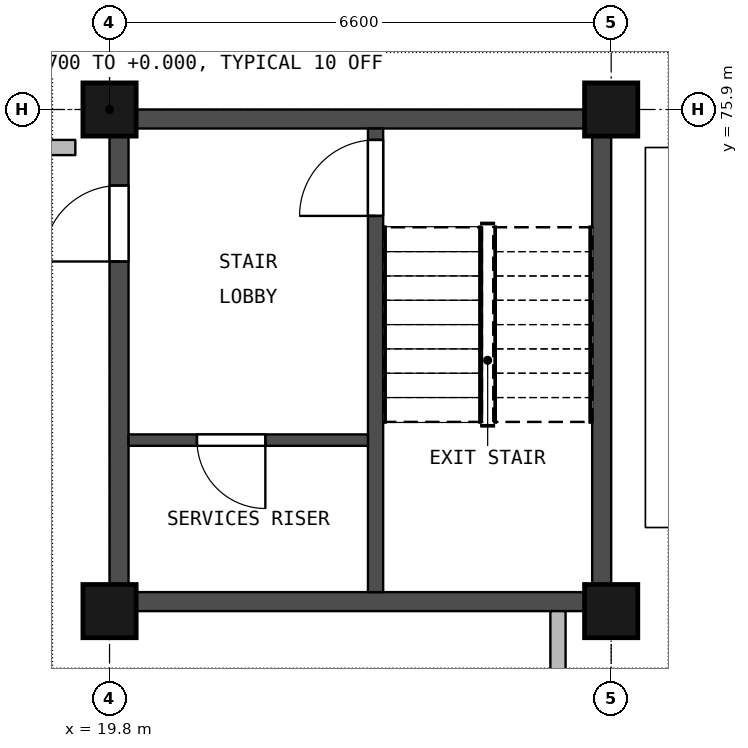
"""IFC4 building model, lengths in metres.
Left out: names, types, materials, properties, quantities, classifications, styles, units other than length and angle.
Written with IfcOpenShell. Run it as: python <this file> out.ifc"""

import sys

from ifc_helpers import new_model, si_unit, direction, frame, frame_2d, origin, origin_2d, place, context, subcontext, project, spatial, rectangle, extrude, element, fill, save


model = new_model("IFC4")
c1 = context("Model", 3, precision=1e-05, world=origin(), true_north=direction((0.0, 1.0)))
c2 = subcontext(c1, "Body", "Model", "MODEL_VIEW")
j1 = project(units=[si_unit("LENGTHUNIT", "METRE"), si_unit("PLANEANGLEUNIT", "RADIAN")], contexts=[c1])
p1 = place(None, origin())
s1 = spatial("IfcSite", under=j1, at=p1, CompositionType="ELEMENT")
p2 = place(p1, origin())
s2 = spatial("IfcBuilding", under=s1, at=p2, CompositionType="ELEMENT")
p3 = place(p2, frame((0.0, 0.0, -5.7)))
s3 = spatial("IfcBuildingStorey", under=s2, at=p3, CompositionType="ELEMENT", Elevation=-5.7)
for number, where, z_axis, x_axis in (
    (1, (19.8, 69.3, 0.0), (0.0, 0.0, 1.0), (1.0, 0.0, 0.0)),
    (2, (19.8, 75.9, 0.0), (0.0, 0.0, 1.0), (1.0, 0.0, 0.0)),
    (3, (26.4, 69.3, 0.0), (0.0, 0.0, 1.0), (1.0, 0.0, 0.0)),
    (4, (26.4, 75.9, 0.0), (0.0, 0.0, 1.0), (1.0, 0.0, 0.0)),
):
    element("IfcColumn", number, at=place(p3, frame(where, z_axis=z_axis, x_axis=x_axis)), inside=s3, PredefinedType="COLUMN", context=c2, shape_type="SweptSolid", body=[
        extrude(rectangle(XDim=0.7, YDim=0.7, at=origin_2d()), origin(), (0.0, 0.0, 1.0), 5.7),
    ])
p4 = place(p3, frame((19.925, 75.9, 0.0), z_axis=(0.0, 0.0, 1.0), x_axis=(0.0, -1.0, 0.0)))
e5 = element("IfcWall", 5, at=p4, inside=s3, PredefinedType="SHEAR", context=c2, shape_type="SweptSolid", body=[
    extrude(rectangle(XDim=6.6, YDim=0.25, at=frame_2d((3.3, 0.0))), origin(), (0.0, 0.0, 1.0), 5.2),
])
p5 = place(p4, frame((1.0, 0.0, 0.0)))
e6 = element("IfcOpeningElement", 6, at=p5, cuts=e5, PredefinedType="OPENING", context=c2, shape_type="SweptSolid", body=[
    extrude(rectangle(XDim=1.0, YDim=2.1, at=frame_2d((0.5, 1.05))), frame((0.0, 0.135, 0.0), z_axis=(0.0, -1.0, 0.0), x_axis=(1.0, 0.0, 0.0)), (0.0, 0.0, 1.0), 0.27),
])
p6 = place(p3, frame((26.275, 75.9, 0.0), z_axis=(0.0, 0.0, 1.0), x_axis=(0.0, -1.0, 0.0)))
e7 = element("IfcWall", 7, at=p6, inside=s3, PredefinedType="SHEAR", context=c2, shape_type="SweptSolid", body=[
    extrude(rectangle(XDim=6.6, YDim=0.25, at=frame_2d((3.3, 0.0))), origin(), (0.0, 0.0, 1.0), 5.2),
])
for number, where, z_axis, x_axis in (
    (8, (20.05, 75.775, 0.0), (0.0, 0.0, 1.0), (1.0, 0.0, 0.0)),
    (9, (20.05, 69.425, 0.0), (0.0, 0.0, 1.0), (1.0, 0.0, 0.0)),
):
    element("IfcWall", number, at=place(p3, frame(where, z_axis=z_axis, x_axis=x_axis)), inside=s3, PredefinedType="SHEAR", context=c2, shape_type="SweptSolid", body=[
        extrude(rectangle(XDim=6.1, YDim=0.25, at=frame_2d((3.05, 0.0))), origin(), (0.0, 0.0, 1.0), 5.2),
    ])
p7 = place(p3, frame((23.3, 75.65, 0.0), z_axis=(0.0, 0.0, 1.0), x_axis=(0.0, -1.0, 0.0)))
e10 = element("IfcWall", 10, at=p7, inside=s3, PredefinedType="SHEAR", context=c2, shape_type="SweptSolid", body=[
    extrude(rectangle(XDim=6.1, YDim=0.2, at=frame_2d((3.05, 0.0))), origin(), (0.0, 0.0, 1.0), 5.2),
])
p8 = place(p7, frame((0.15, 0.0, 0.0)))
e11 = element("IfcOpeningElement", 11, at=p8, cuts=e10, PredefinedType="OPENING", context=c2, shape_type="SweptSolid", body=[
    extrude(rectangle(XDim=1.0, YDim=2.1, at=frame_2d((0.5, 1.05))), frame((0.0, 0.11, 0.0), z_axis=(0.0, -1.0, 0.0), x_axis=(1.0, 0.0, 0.0)), (0.0, 0.0, 1.0), 0.22),
])
p9 = place(p3, frame((20.05, 71.55, 0.0), z_axis=(0.0, 0.0, 1.0), x_axis=(1.0, 0.0, 0.0)))
e12 = element("IfcWall", 12, at=p9, inside=s3, PredefinedType="SHEAR", context=c2, shape_type="SweptSolid", body=[
    extrude(rectangle(XDim=3.15, YDim=0.15, at=frame_2d((1.575, 0.0))), origin(), (0.0, 0.0, 1.0), 5.2),
])
p10 = place(p9, frame((0.9, 0.0, 0.0)))
e13 = element("IfcOpeningElement", 13, at=p10, cuts=e12, PredefinedType="OPENING", context=c2, shape_type="SweptSolid", body=[
    extrude(rectangle(XDim=0.9, YDim=2.1, at=frame_2d((0.45, 1.05))), frame((0.0, 0.085, 0.0), z_axis=(0.0, -1.0, 0.0), x_axis=(1.0, 0.0, 0.0)), (0.0, 0.0, 1.0), 0.17),
])
p11 = place(p3, frame((13.65, 75.4, 0.0), z_axis=(0.0, 0.0, 1.0), x_axis=(1.0, 0.0, 0.0)))
e14 = element("IfcWall", 14, at=p11, inside=s3, PredefinedType="PARTITIONING", context=c2, shape_type="SweptSolid", body=[
    extrude(rectangle(XDim=5.7, YDim=0.2, at=frame_2d((2.85, 0.0))), origin(), (0.0, 0.0, 1.0), 5.25),
])
p12 = place(p3, frame((25.7, 49.575, 0.0), z_axis=(0.0, 0.0, 1.0), x_axis=(0.0, 1.0, 0.0)))
e15 = element("IfcWall", 15, at=p12, inside=s3, PredefinedType="PARTITIONING", context=c2, shape_type="SweptSolid", body=[
    extrude(rectangle(XDim=19.725, YDim=0.2, at=frame_2d((9.863, 0.0))), origin(), (0.0, 0.0, 1.0), 4.45),
])
p13 = place(p10, origin())
e16 = element("IfcDoor", 16, at=p13, inside=s3, OperationType="SINGLE_SWING_RIGHT", PredefinedType="DOOR", context=c2, shape_type="SweptSolid", body=[
    extrude(rectangle(XDim=0.9, YDim=2.1, at=frame_2d((0.45, 1.05))), frame((0.0, 0.025, 0.0), z_axis=(0.0, -1.0, 0.0), x_axis=(1.0, 0.0, 0.0)), (0.0, 0.0, 1.0), 0.05),
])
fill(e13, e16)
p14 = place(p5, origin())
e17 = element("IfcDoor", 17, at=p14, inside=s3, OperationType="SINGLE_SWING_RIGHT", PredefinedType="DOOR", context=c2, shape_type="SweptSolid", body=[
    extrude(rectangle(XDim=1.0, YDim=2.1, at=frame_2d((0.5, 1.05))), frame((0.0, 0.025, 0.0), z_axis=(0.0, -1.0, 0.0), x_axis=(1.0, 0.0, 0.0)), (0.0, 0.0, 1.0), 0.05),
])
fill(e6, e17)
p15 = place(p8, origin())
e18 = element("IfcDoor", 18, at=p15, inside=s3, OperationType="SINGLE_SWING_RIGHT", PredefinedType="DOOR", context=c2, shape_type="SweptSolid", body=[
    extrude(rectangle(XDim=1.0, YDim=2.1, at=frame_2d((0.5, 1.05))), frame((0.0, 0.025, 0.0), z_axis=(0.0, -1.0, 0.0), x_axis=(1.0, 0.0, 0.0)), (0.0, 0.0, 1.0), 0.05),
])
fill(e11, e18)
save(model, sys.argv[1])
